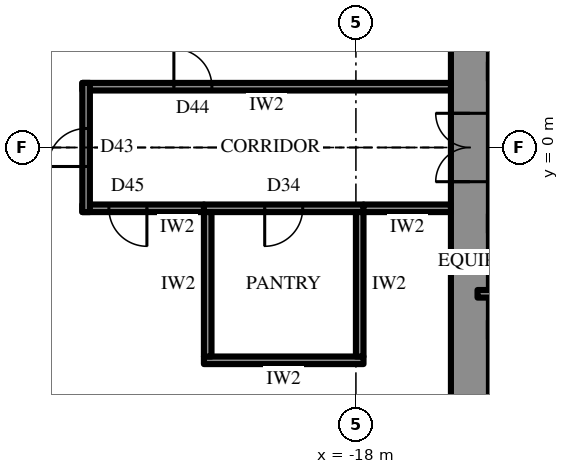
"""IFC4 building model, lengths in metres.
Left out: names, types, materials, properties, quantities, classifications, styles, units other than length and angle.
Written with IfcOpenShell. Run it as: python <this file> out.ifc"""

import sys

from ifc_helpers import new_model, si_unit, direction, frame, frame_2d, origin, place, context, subcontext, project, spatial, rectangle, extrude, element, fill, save


model = new_model("IFC4")
c1 = context("Model", 3, precision=1e-05, world=origin(), true_north=direction((0.0, 1.0)))
c2 = subcontext(c1, "Body", "Model", "MODEL_VIEW")
j1 = project(units=[si_unit("LENGTHUNIT", "METRE"), si_unit("PLANEANGLEUNIT", "RADIAN")], contexts=[c1])
p1 = place(None, origin())
s1 = spatial("IfcSite", under=j1, at=p1, CompositionType="ELEMENT")
p2 = place(p1, origin())
s2 = spatial("IfcBuilding", under=s1, at=p2, CompositionType="ELEMENT")
p3 = place(p2, frame((0.0, 0.0, 236.5)))
s3 = spatial("IfcBuildingStorey", under=s2, at=p3, CompositionType="ELEMENT", Elevation=236.5)
p4 = place(p3, frame((-15.0, 10.7, 0.0), z_axis=(0.0, 0.0, 1.0), x_axis=(0.0, -1.0, 0.0)))
e1 = element("IfcWall", 1, at=p4, inside=s3, PredefinedType="SHEAR", context=c2, shape_type="SweptSolid", body=[
    extrude(rectangle(XDim=21.4, YDim=1.0, at=frame_2d((10.7, 0.0))), origin(), (0.0, 0.0, 1.0), 4.2),
])
p5 = place(p4, frame((9.8, 0.0, 0.0)))
e2 = element("IfcOpeningElement", 2, at=p5, cuts=e1, PredefinedType="OPENING", context=c2, shape_type="SweptSolid", body=[
    extrude(rectangle(XDim=1.8, YDim=2.4, at=frame_2d((0.9, 1.2))), frame((0.0, 0.51, 0.0), z_axis=(0.0, -1.0, 0.0), x_axis=(1.0, 0.0, 0.0)), (0.0, 0.0, 1.0), 1.02),
])
p6 = place(p3, frame((-12.3, -2.0, 0.0), z_axis=(0.0, 0.0, 1.0), x_axis=(-1.0, 0.0, 0.0)))
e3 = element("IfcWall", 3, at=p6, inside=s3, PredefinedType="SHEAR", context=c2, shape_type="SweptSolid", body=[
    extrude(rectangle(XDim=2.2, YDim=0.5, at=frame_2d((1.1, 0.0))), origin(), (0.0, 0.0, 1.0), 4.2),
])
p7 = place(p6, frame((0.8, 0.0, 0.0)))
e4 = element("IfcOpeningElement", 4, at=p7, cuts=e3, PredefinedType="OPENING", context=c2, shape_type="SweptSolid", body=[
    extrude(rectangle(XDim=0.9, YDim=2.2, at=frame_2d((0.45, 1.1))), frame((0.0, 0.26, 0.0), z_axis=(0.0, -1.0, 0.0), x_axis=(1.0, 0.0, 0.0)), (0.0, 0.0, 1.0), 0.52),
])
p8 = place(p3, frame((-12.3, -4.8, 0.0), z_axis=(0.0, 0.0, 1.0), x_axis=(-1.0, 0.0, 0.0)))
e5 = element("IfcWall", 5, at=p8, inside=s3, PredefinedType="SHEAR", context=c2, shape_type="SweptSolid", body=[
    extrude(rectangle(XDim=2.2, YDim=0.5, at=frame_2d((1.1, 0.0))), origin(), (0.0, 0.0, 1.0), 4.2),
])
p9 = place(p3, frame((-31.263, -3.551, 0.0), z_axis=(0.0, 0.0, 1.0), x_axis=(0.500000442367, -0.866025148383, 0.0)))
e6 = element("IfcWall", 6, at=p9, inside=s3, PredefinedType="SOLIDWALL", context=c2, shape_type="SweptSolid", body=[
    extrude(rectangle(XDim=25.113, YDim=0.3, at=frame_2d((12.556, 0.0))), origin(), (0.0, 0.0, 1.0), 2.8),
])
p10 = place(p9, frame((4.278, 0.0, 0.6)))
e7 = element("IfcOpeningElement", 7, at=p10, cuts=e6, PredefinedType="OPENING", context=c2, shape_type="SweptSolid", body=[
    extrude(rectangle(XDim=2.7, YDim=1.95, at=frame_2d((1.35, 0.975))), frame((0.0, 0.16, 0.0), z_axis=(0.0, -1.0, 0.0), x_axis=(1.0, 0.0, 0.0)), (0.0, 0.0, 1.0), 0.32),
])
p11 = place(p9, frame((9.647, 0.0, 0.0)))
e8 = element("IfcOpeningElement", 8, at=p11, cuts=e6, PredefinedType="OPENING", context=c2, shape_type="SweptSolid", body=[
    extrude(rectangle(XDim=1.2, YDim=2.4, at=frame_2d((0.6, 1.2))), frame((0.0, 0.16, 0.0), z_axis=(0.0, -1.0, 0.0), x_axis=(1.0, 0.0, 0.0)), (0.0, 0.0, 1.0), 0.32),
])
p12 = place(p9, frame((13.516, 0.0, 0.6)))
e9 = element("IfcOpeningElement", 9, at=p12, cuts=e6, PredefinedType="OPENING", context=c2, shape_type="SweptSolid", body=[
    extrude(rectangle(XDim=2.7, YDim=1.95, at=frame_2d((1.35, 0.975))), frame((0.0, 0.16, 0.0), z_axis=(0.0, -1.0, 0.0), x_axis=(1.0, 0.0, 0.0)), (0.0, 0.0, 1.0), 0.32),
])
p13 = place(p9, frame((18.135, 0.0, 0.6)))
e10 = element("IfcOpeningElement", 10, at=p13, cuts=e6, PredefinedType="OPENING", context=c2, shape_type="SweptSolid", body=[
    extrude(rectangle(XDim=2.7, YDim=1.95, at=frame_2d((1.35, 0.975))), frame((0.0, 0.16, 0.0), z_axis=(0.0, -1.0, 0.0), x_axis=(1.0, 0.0, 0.0)), (0.0, 0.0, 1.0), 0.32),
])
p14 = place(p3, frame((-12.3, -3.85, 0.0), z_axis=(0.0, 0.0, 1.0), x_axis=(-1.0, 0.0, 0.0)))
e11 = element("IfcWall", 11, at=p14, inside=s3, PredefinedType="PARTITIONING", context=c2, shape_type="SweptSolid", body=[
    extrude(rectangle(XDim=2.5, YDim=0.2, at=frame_2d((1.25, 0.0))), origin(), (0.0, 0.0, 1.0), 4.0),
])
p15 = place(p3, frame((-17.8, -1.6, 0.0), z_axis=(0.0, 0.0, 1.0), x_axis=(-1.0, 0.0, 0.0)))
e12 = element("IfcWall", 12, at=p15, inside=s3, PredefinedType="PARTITIONING", context=c2, shape_type="SweptSolid", body=[
    extrude(rectangle(XDim=4.2, YDim=0.2, at=frame_2d((2.1, 0.0))), origin(), (0.0, 0.0, 1.0), 4.0),
])
p16 = place(p15, frame((1.6, 0.0, 0.0)))
e13 = element("IfcOpeningElement", 13, at=p16, cuts=e12, PredefinedType="OPENING", context=c2, shape_type="SweptSolid", body=[
    extrude(rectangle(XDim=1.0, YDim=2.2, at=frame_2d((0.5, 1.1))), frame((0.0, 0.11, 0.0), z_axis=(0.0, -1.0, 0.0), x_axis=(1.0, 0.0, 0.0)), (0.0, 0.0, 1.0), 0.22),
])
p17 = place(p3, frame((-17.8, -5.6, 0.0), z_axis=(0.0, 0.0, 1.0), x_axis=(-1.0, 0.0, 0.0)))
e14 = element("IfcWall", 14, at=p17, inside=s3, PredefinedType="PARTITIONING", context=c2, shape_type="SweptSolid", body=[
    extrude(rectangle(XDim=4.2, YDim=0.2, at=frame_2d((2.1, 0.0))), origin(), (0.0, 0.0, 1.0), 4.0),
])
for number, where, z_axis, x_axis in (
    (15, (-17.9, -1.7, 0.0), (0.0, 0.0, 1.0), (0.0, -1.0, 0.0)),
    (16, (-21.9, -1.7, 0.0), (0.0, 0.0, 1.0), (0.0, -1.0, 0.0)),
):
    element("IfcWall", number, at=place(p3, frame(where, z_axis=z_axis, x_axis=x_axis)), inside=s3, PredefinedType="PARTITIONING", context=c2, shape_type="SweptSolid", body=[
        extrude(rectangle(XDim=3.8, YDim=0.2, at=frame_2d((1.9, 0.0))), origin(), (0.0, 0.0, 1.0), 4.0),
    ])
p18 = place(p3, frame((-15.5, 1.6, 0.0), z_axis=(0.0, 0.0, 1.0), x_axis=(-1.0, 0.0, 0.0)))
e17 = element("IfcWall", 17, at=p18, inside=s3, PredefinedType="PARTITIONING", context=c2, shape_type="SweptSolid", body=[
    extrude(rectangle(XDim=9.7, YDim=0.2, at=frame_2d((4.85, 0.0))), origin(), (0.0, 0.0, 1.0), 4.0),
])
p19 = place(p18, frame((6.29, 0.0, 0.0)))
e18 = element("IfcOpeningElement", 18, at=p19, cuts=e17, PredefinedType="OPENING", context=c2, shape_type="SweptSolid", body=[
    extrude(rectangle(XDim=1.0, YDim=2.2, at=frame_2d((0.5, 1.1))), frame((0.0, 0.11, 0.0), z_axis=(0.0, -1.0, 0.0), x_axis=(1.0, 0.0, 0.0)), (0.0, 0.0, 1.0), 0.22),
])
p20 = place(p3, frame((-22.0, -1.6, 0.0), z_axis=(0.0, 0.0, 1.0), x_axis=(-1.0, 0.0, 0.0)))
e19 = element("IfcWall", 19, at=p20, inside=s3, PredefinedType="PARTITIONING", context=c2, shape_type="SweptSolid", body=[
    extrude(rectangle(XDim=3.2, YDim=0.2, at=frame_2d((1.6, 0.0))), origin(), (0.0, 0.0, 1.0), 4.0),
])
p21 = place(p20, frame((1.5, 0.0, 0.0)))
e20 = element("IfcOpeningElement", 20, at=p21, cuts=e19, PredefinedType="OPENING", context=c2, shape_type="SweptSolid", body=[
    extrude(rectangle(XDim=1.0, YDim=2.2, at=frame_2d((0.5, 1.1))), frame((0.0, 0.11, 0.0), z_axis=(0.0, -1.0, 0.0), x_axis=(1.0, 0.0, 0.0)), (0.0, 0.0, 1.0), 0.22),
])
p22 = place(p3, frame((-15.5, -1.6, 0.0), z_axis=(0.0, 0.0, 1.0), x_axis=(-1.0, 0.0, 0.0)))
e21 = element("IfcWall", 21, at=p22, inside=s3, PredefinedType="PARTITIONING", context=c2, shape_type="SweptSolid", body=[
    extrude(rectangle(XDim=2.3, YDim=0.2, at=frame_2d((1.15, 0.0))), origin(), (0.0, 0.0, 1.0), 4.0),
])
p23 = place(p3, frame((-25.1, -1.7, 0.0), z_axis=(0.0, 0.0, 1.0), x_axis=(0.0, 1.0, 0.0)))
e22 = element("IfcWall", 22, at=p23, inside=s3, PredefinedType="PARTITIONING", context=c2, shape_type="SweptSolid", body=[
    extrude(rectangle(XDim=3.4, YDim=0.2, at=frame_2d((1.7, 0.0))), origin(), (0.0, 0.0, 1.0), 4.0),
])
p24 = place(p23, frame((1.2, 0.0, 0.0)))
e23 = element("IfcOpeningElement", 23, at=p24, cuts=e22, PredefinedType="OPENING", context=c2, shape_type="SweptSolid", body=[
    extrude(rectangle(XDim=1.0, YDim=2.2, at=frame_2d((0.5, 1.1))), frame((0.0, 0.11, 0.0), z_axis=(0.0, -1.0, 0.0), x_axis=(1.0, 0.0, 0.0)), (0.0, 0.0, 1.0), 0.22),
])
p25 = place(p5, frame((1.8, 0.0, 0.0), z_axis=(0.0, 0.0, 1.0), x_axis=(-1.0, 0.0, 0.0)))
e24 = element("IfcDoor", 24, at=p25, inside=s3, OperationType="DOUBLE_DOOR_SINGLE_SWING", PredefinedType="DOOR", context=c2, shape_type="SweptSolid", body=[
    extrude(rectangle(XDim=1.8, YDim=2.4, at=frame_2d((0.9, 1.2))), frame((0.0, 0.025, 0.0), z_axis=(0.0, -1.0, 0.0), x_axis=(1.0, 0.0, 0.0)), (0.0, 0.0, 1.0), 0.05),
])
fill(e2, e24)
p26 = place(p16, origin())
e25 = element("IfcDoor", 25, at=p26, inside=s3, OperationType="SINGLE_SWING_LEFT", PredefinedType="DOOR", context=c2, shape_type="SweptSolid", body=[
    extrude(rectangle(XDim=1.0, YDim=2.2, at=frame_2d((0.5, 1.1))), frame((0.0, 0.025, 0.0), z_axis=(0.0, -1.0, 0.0), x_axis=(1.0, 0.0, 0.0)), (0.0, 0.0, 1.0), 0.05),
])
fill(e13, e25)
p27 = place(p19, frame((1.0, 0.0, 0.0), z_axis=(0.0, 0.0, 1.0), x_axis=(-1.0, 0.0, 0.0)))
e26 = element("IfcDoor", 26, at=p27, inside=s3, OperationType="SINGLE_SWING_RIGHT", PredefinedType="DOOR", context=c2, shape_type="SweptSolid", body=[
    extrude(rectangle(XDim=1.0, YDim=2.2, at=frame_2d((0.5, 1.1))), frame((0.0, 0.025, 0.0), z_axis=(0.0, -1.0, 0.0), x_axis=(1.0, 0.0, 0.0)), (0.0, 0.0, 1.0), 0.05),
])
fill(e18, e26)
p28 = place(p21, origin())
e27 = element("IfcDoor", 27, at=p28, inside=s3, OperationType="SINGLE_SWING_RIGHT", PredefinedType="DOOR", context=c2, shape_type="SweptSolid", body=[
    extrude(rectangle(XDim=1.0, YDim=2.2, at=frame_2d((0.5, 1.1))), frame((0.0, 0.025, 0.0), z_axis=(0.0, -1.0, 0.0), x_axis=(1.0, 0.0, 0.0)), (0.0, 0.0, 1.0), 0.05),
])
fill(e20, e27)
p29 = place(p24, origin())
e28 = element("IfcDoor", 28, at=p29, inside=s3, OperationType="SINGLE_SWING_RIGHT", PredefinedType="DOOR", context=c2, shape_type="SweptSolid", body=[
    extrude(rectangle(XDim=1.0, YDim=2.2, at=frame_2d((0.5, 1.1))), frame((0.0, 0.025, 0.0), z_axis=(0.0, -1.0, 0.0), x_axis=(1.0, 0.0, 0.0)), (0.0, 0.0, 1.0), 0.05),
])
fill(e23, e28)
save(model, sys.argv[1])
